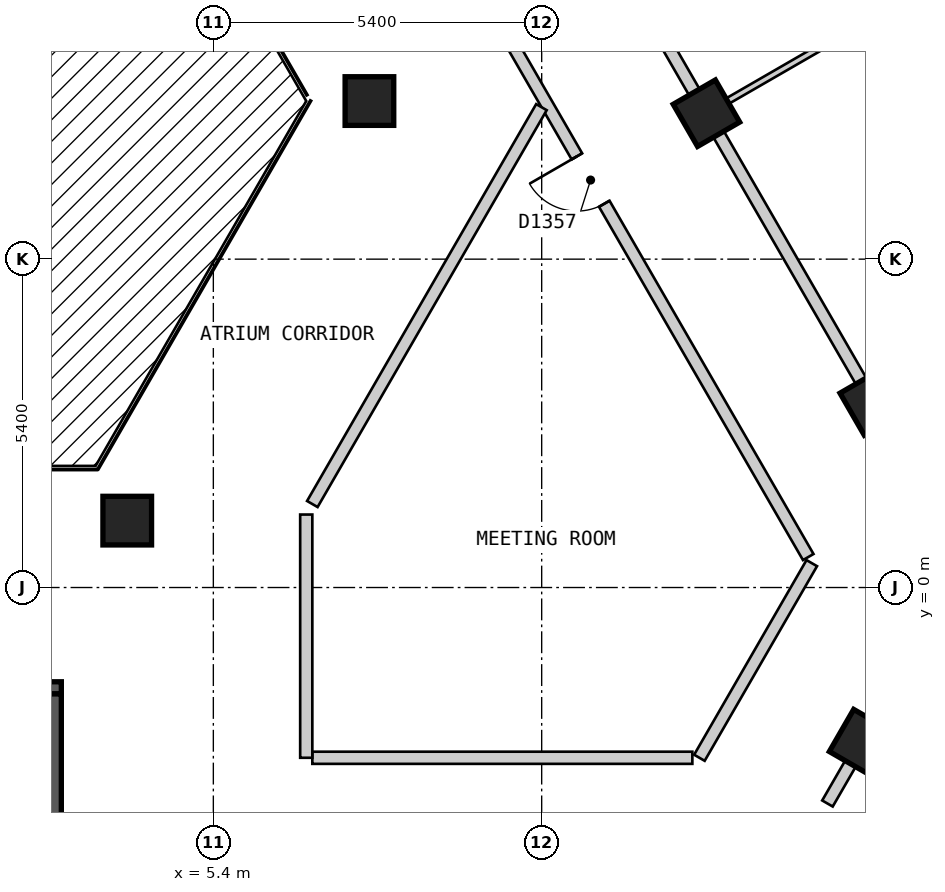
"""IFC4 building model, lengths in metres.
Left out: names, types, materials, properties, quantities, classifications, styles, units other than length and angle.
Written with IfcOpenShell. Run it as: python <this file> out.ifc"""

import sys

from ifc_helpers import new_model, si_unit, direction, frame, frame_2d, origin, origin_2d, place, context, subcontext, project, spatial, polyline, rectangle, outline, extrude, element, fill, save


model = new_model("IFC4")
c1 = context("Model", 3, precision=1e-05, world=origin(), true_north=direction((0.0, 1.0)))
c2 = subcontext(c1, "Body", "Model", "MODEL_VIEW")
j1 = project(units=[si_unit("LENGTHUNIT", "METRE"), si_unit("PLANEANGLEUNIT", "RADIAN")], contexts=[c1])
p1 = place(None, origin())
s1 = spatial("IfcSite", under=j1, at=p1, CompositionType="ELEMENT")
p2 = place(p1, origin())
s2 = spatial("IfcBuilding", under=s1, at=p2, CompositionType="ELEMENT")
p3 = place(p2, frame((0.0, 0.0, 147.6)))
s3 = spatial("IfcBuildingStorey", under=s2, at=p3, CompositionType="ELEMENT", Elevation=147.6)
for number, where, z_axis, x_axis in (
    (1, (16.078, -2.551, 0.0), (0.0, 0.0, 1.0), (0.5, 0.866, 0.0)),
    (2, (16.253, 3.05, 0.0), (0.0, 0.0, 1.0), (-0.5, 0.866, 0.0)),
    (3, (3.984, 1.1, 0.0), (0.0, 0.0, 1.0), (1.0, 0.0, 0.0)),
    (4, (13.51, 7.8, 0.0), (0.0, 0.0, 1.0), (-0.5, 0.866, 0.0)),
    (5, (7.967, 8.0, 0.0), (0.0, 0.0, 1.0), (1.0, 0.0, 0.0)),
):
    element("IfcColumn", number, at=place(p3, frame(where, z_axis=z_axis, x_axis=x_axis)), inside=s3, PredefinedType="COLUMN", context=c2, shape_type="SweptSolid", body=[
        extrude(rectangle(XDim=0.8, YDim=0.8, at=origin_2d()), origin(), (0.0, 0.0, 1.0), 3.0),
    ])
p4 = place(p3, frame((15.862, -23.425, 0.0), z_axis=(0.0, 0.0, 1.0), x_axis=(0.500017503135, 0.866015298109, 0.0)))
e6 = element("IfcWall", 6, at=p4, inside=s3, PredefinedType="SOLIDWALL", context=c2, shape_type="SweptSolid", body=[
    extrude(outline(polyline([(0.0, -0.15), (24.711, -0.15), (24.631, 0.15), (0.08, 0.15), (0.0, -0.15)])), origin(), (0.0, 0.0, 1.0), 2.7),
])
p5 = place(p4, frame((2.857, 0.0, 0.15)))
e7 = element("IfcOpeningElement", 7, at=p5, cuts=e6, PredefinedType="OPENING", context=c2, shape_type="SweptSolid", body=[
    extrude(rectangle(XDim=1.5, YDim=2.1, at=frame_2d((0.75, 1.05))), frame((0.0, 0.16, 0.0), z_axis=(0.0, -1.0, 0.0), x_axis=(1.0, 0.0, 0.0)), (0.0, 0.0, 1.0), 0.32),
])
p6 = place(p4, frame((8.689, 0.0, 0.15)))
e8 = element("IfcOpeningElement", 8, at=p6, cuts=e6, PredefinedType="OPENING", context=c2, shape_type="SweptSolid", body=[
    extrude(rectangle(XDim=1.5, YDim=2.1, at=frame_2d((0.75, 1.05))), frame((0.0, 0.16, 0.0), z_axis=(0.0, -1.0, 0.0), x_axis=(1.0, 0.0, 0.0)), (0.0, 0.0, 1.0), 0.32),
])
p7 = place(p4, frame((14.52, 0.0, 0.15)))
e9 = element("IfcOpeningElement", 9, at=p7, cuts=e6, PredefinedType="OPENING", context=c2, shape_type="SweptSolid", body=[
    extrude(rectangle(XDim=1.5, YDim=2.1, at=frame_2d((0.75, 1.05))), frame((0.0, 0.16, 0.0), z_axis=(0.0, -1.0, 0.0), x_axis=(1.0, 0.0, 0.0)), (0.0, 0.0, 1.0), 0.32),
])
p8 = place(p4, frame((20.351, 0.0, 0.15)))
e10 = element("IfcOpeningElement", 10, at=p8, cuts=e6, PredefinedType="OPENING", context=c2, shape_type="SweptSolid", body=[
    extrude(rectangle(XDim=1.5, YDim=2.1, at=frame_2d((0.75, 1.05))), frame((0.0, 0.16, 0.0), z_axis=(0.0, -1.0, 0.0), x_axis=(1.0, 0.0, 0.0)), (0.0, 0.0, 1.0), 0.32),
])
p9 = place(p3, frame((-2.9, -1.65, 0.0), z_axis=(0.0, 0.0, 1.0), x_axis=(1.0, 0.0, 0.0)))
e11 = element("IfcWall", 11, at=p9, inside=s3, PredefinedType="SOLIDWALL", context=c2, shape_type="SweptSolid", body=[
    extrude(rectangle(XDim=5.8, YDim=0.2, at=frame_2d((2.9, 0.0))), origin(), (0.0, 0.0, 1.0), 2.7),
])
p10 = place(p9, frame((0.3, 0.0, 0.0)))
e12 = element("IfcOpeningElement", 12, at=p10, cuts=e11, PredefinedType="OPENING", context=c2, shape_type="SweptSolid", body=[
    extrude(rectangle(XDim=1.2, YDim=2.1, at=frame_2d((0.6, 1.05))), frame((0.0, 0.11, 0.0), z_axis=(0.0, -1.0, 0.0), x_axis=(1.0, 0.0, 0.0)), (0.0, 0.0, 1.0), 0.22),
])
p11 = place(p3, frame((2.8, -4.5, 0.0), z_axis=(0.0, 0.0, 1.0), x_axis=(0.0, 1.0, 0.0)))
e13 = element("IfcWall", 13, at=p11, inside=s3, PredefinedType="SOLIDWALL", context=c2, shape_type="SweptSolid", body=[
    extrude(rectangle(XDim=2.75, YDim=0.2, at=frame_2d((1.375, 0.0))), origin(), (0.0, 0.0, 1.0), 2.7),
])
p12 = place(p3, frame((7.967, 13.0, 0.0), z_axis=(0.0, 0.0, 1.0), x_axis=(0.50003774998, -0.866003607726, 0.0)))
e14 = element("IfcWall", 14, at=p12, inside=s3, PredefinedType="PARTITIONING", context=c2, shape_type="SweptSolid", body=[
    extrude(rectangle(XDim=14.433, YDim=0.2, at=frame_2d((7.217, 0.0))), origin(), (0.0, 0.0, 1.0), 2.7),
])
p13 = place(p12, frame((6.824, 0.0, 0.0)))
e15 = element("IfcOpeningElement", 15, at=p13, cuts=e14, PredefinedType="OPENING", context=c2, shape_type="SweptSolid", body=[
    extrude(rectangle(XDim=0.9, YDim=2.1, at=frame_2d((0.45, 1.05))), frame((0.0, 0.11, 0.0), z_axis=(0.0, -1.0, 0.0), x_axis=(1.0, 0.0, 0.0)), (0.0, 0.0, 1.0), 0.22),
])
p14 = place(p3, frame((9.296, 15.1, 0.0), z_axis=(0.0, 0.0, 1.0), x_axis=(0.499974024244, -0.866040400375, 0.0)))
e16 = element("IfcWall", 16, at=p14, inside=s3, PredefinedType="PARTITIONING", context=c2, shape_type="SweptSolid", body=[
    extrude(rectangle(XDim=16.857, YDim=0.2, at=frame_2d((8.429, 0.0))), origin(), (0.0, 0.0, 1.0), 2.7),
])
p15 = place(p14, frame((5.209, 0.0, 0.0)))
e17 = element("IfcOpeningElement", 17, at=p15, cuts=e16, PredefinedType="OPENING", context=c2, shape_type="SweptSolid", body=[
    extrude(rectangle(XDim=1.0, YDim=2.1, at=frame_2d((0.5, 1.05))), frame((0.0, 0.11, 0.0), z_axis=(0.0, -1.0, 0.0), x_axis=(1.0, 0.0, 0.0)), (0.0, 0.0, 1.0), 0.22),
])
p16 = place(p3, frame((7.028, -2.8, 0.0), z_axis=(0.0, 0.0, 1.0), x_axis=(1.0, 0.0, 0.0)))
e18 = element("IfcWall", 18, at=p16, inside=s3, PredefinedType="PARTITIONING", context=c2, shape_type="SweptSolid", body=[
    extrude(rectangle(XDim=6.25, YDim=0.2, at=frame_2d((3.125, 0.0))), origin(), (0.0, 0.0, 1.0), 2.7),
])
p17 = place(p3, frame((7.028, 1.373, 0.0), z_axis=(0.0, 0.0, 1.0), x_axis=(0.499954271211, 0.866051803703, 0.0)))
e19 = element("IfcWall", 19, at=p17, inside=s3, PredefinedType="PARTITIONING", context=c2, shape_type="SweptSolid", body=[
    extrude(rectangle(XDim=7.536, YDim=0.2, at=frame_2d((3.768, 0.0))), origin(), (0.0, 0.0, 1.0), 2.7),
])
p18 = place(p3, frame((13.394, -2.8, 0.0), z_axis=(0.0, 0.0, 1.0), x_axis=(0.499968324138, 0.866043691079, 0.0)))
e20 = element("IfcWall", 20, at=p18, inside=s3, PredefinedType="PARTITIONING", context=c2, shape_type="SweptSolid", body=[
    extrude(rectangle(XDim=3.696, YDim=0.2, at=frame_2d((1.848, 0.0))), origin(), (0.0, 0.0, 1.0), 2.7),
])
p19 = place(p3, frame((15.5, -3.552, 0.0), z_axis=(0.0, 0.0, 1.0), x_axis=(0.499928303779, 0.86606679366, 0.0)))
e21 = element("IfcWall", 21, at=p19, inside=s3, PredefinedType="PARTITIONING", context=c2, shape_type="SweptSolid", body=[
    extrude(rectangle(XDim=4.449, YDim=0.2, at=frame_2d((2.225, 0.0))), origin(), (0.0, 0.0, 1.0), 2.7),
])
p20 = place(p19, frame((3.432, 0.0, 0.0)))
e22 = element("IfcOpeningElement", 22, at=p20, cuts=e21, PredefinedType="OPENING", context=c2, shape_type="SweptSolid", body=[
    extrude(rectangle(XDim=0.8, YDim=2.1, at=frame_2d((0.4, 1.05))), frame((0.0, 0.11, 0.0), z_axis=(0.0, -1.0, 0.0), x_axis=(1.0, 0.0, 0.0)), (0.0, 0.0, 1.0), 0.22),
])
p21 = place(p3, frame((6.928, -2.8, 0.0), z_axis=(0.0, 0.0, 1.0), x_axis=(0.0, 1.0, 0.0)))
e23 = element("IfcWall", 23, at=p21, inside=s3, PredefinedType="PARTITIONING", context=c2, shape_type="SweptSolid", body=[
    extrude(rectangle(XDim=4.0, YDim=0.2, at=frame_2d((2.0, 0.0))), origin(), (0.0, 0.0, 1.0), 2.7),
])
p22 = place(p3, frame((11.713, 19.313, 0.0), z_axis=(0.0, 0.0, 1.0), x_axis=(0.499999523185, -0.866025679073, 0.0)))
e24 = element("IfcWall", 24, at=p22, inside=s3, PredefinedType="PARTITIONING", context=c2, shape_type="SweptSolid", body=[
    extrude(rectangle(XDim=21.738, YDim=0.1, at=frame_2d((10.869, 0.0))), origin(), (0.0, 0.0, 1.0), 2.7),
])
p23 = place(p22, frame((7.654, 0.0, 0.0)))
e25 = element("IfcOpeningElement", 25, at=p23, cuts=e24, PredefinedType="OPENING", context=c2, shape_type="SweptSolid", body=[
    extrude(rectangle(XDim=0.9, YDim=2.1, at=frame_2d((0.45, 1.05))), frame((0.0, 0.06, 0.0), z_axis=(0.0, -1.0, 0.0), x_axis=(1.0, 0.0, 0.0)), (0.0, 0.0, 1.0), 0.12),
])
p24 = place(p22, frame((13.202, 0.0, 0.0)))
e26 = element("IfcOpeningElement", 26, at=p24, cuts=e24, PredefinedType="OPENING", context=c2, shape_type="SweptSolid", body=[
    extrude(rectangle(XDim=0.8, YDim=2.1, at=frame_2d((0.4, 1.05))), frame((0.0, 0.06, 0.0), z_axis=(0.0, -1.0, 0.0), x_axis=(1.0, 0.0, 0.0)), (0.0, 0.0, 1.0), 0.12),
])
p25 = place(p22, frame((2.242, 0.0, 0.0)))
e27 = element("IfcOpeningElement", 27, at=p25, cuts=e24, PredefinedType="OPENING", context=c2, shape_type="SweptSolid", body=[
    extrude(rectangle(XDim=0.8, YDim=2.1, at=frame_2d((0.4, 1.05))), frame((0.0, 0.06, 0.0), z_axis=(0.0, -1.0, 0.0), x_axis=(1.0, 0.0, 0.0)), (0.0, 0.0, 1.0), 0.12),
])
p26 = place(p22, frame((18.696, 0.0, 0.0)))
e28 = element("IfcOpeningElement", 28, at=p26, cuts=e24, PredefinedType="OPENING", context=c2, shape_type="SweptSolid", body=[
    extrude(rectangle(XDim=0.8, YDim=2.1, at=frame_2d((0.4, 1.05))), frame((0.0, 0.06, 0.0), z_axis=(0.0, -1.0, 0.0), x_axis=(1.0, 0.0, 0.0)), (0.0, 0.0, 1.0), 0.12),
])
p27 = place(p3, frame((13.597, 7.85, 0.0), z_axis=(0.0, 0.0, 1.0), x_axis=(0.866015917575, 0.500016430238, 0.0)))
e29 = element("IfcWall", 29, at=p27, inside=s3, PredefinedType="PARTITIONING", context=c2, shape_type="SweptSolid", body=[
    extrude(rectangle(XDim=4.05, YDim=0.1, at=frame_2d((2.025, 0.0))), origin(), (0.0, 0.0, 1.0), 2.7),
])
p28 = place(p3, frame((16.165, -2.601, 0.0), z_axis=(0.0, 0.0, 1.0), x_axis=(0.866016855193, -0.500014806302, 0.0)))
e30 = element("IfcWall", 30, at=p28, inside=s3, PredefinedType="PARTITIONING", context=c2, shape_type="SweptSolid", body=[
    extrude(rectangle(XDim=10.0, YDim=0.2, at=frame_2d((5.0, 0.0))), origin(), (0.0, 0.0, 1.0), 2.7),
])
p29 = place(p13, origin())
e31 = element("IfcDoor", 31, at=p29, inside=s3, OperationType="SINGLE_SWING_LEFT", PredefinedType="DOOR", context=c2, shape_type="SweptSolid", body=[
    extrude(rectangle(XDim=0.9, YDim=2.1, at=frame_2d((0.45, 1.05))), frame((0.0, 0.025, 0.0), z_axis=(0.0, -1.0, 0.0), x_axis=(1.0, 0.0, 0.0)), (0.0, 0.0, 1.0), 0.05),
])
fill(e15, e31)
save(model, sys.argv[1])
